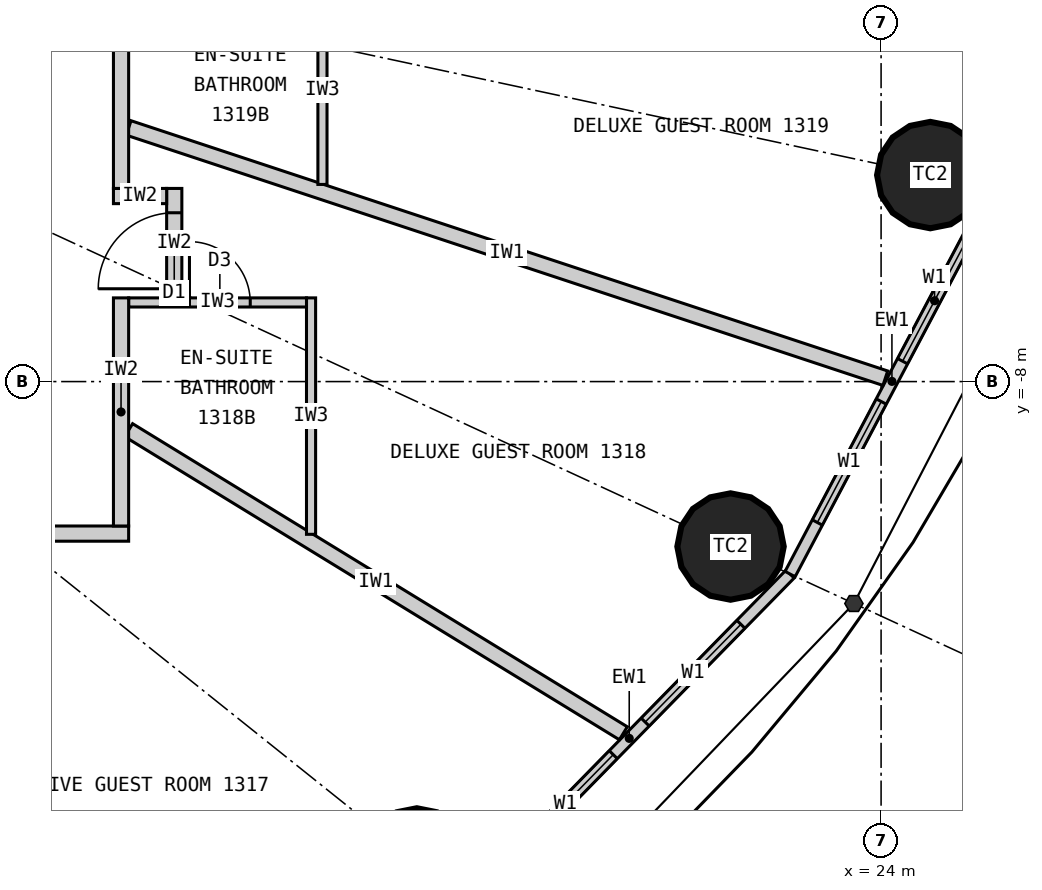
"""IFC4 building model, lengths in metres.
Left out: names, types, materials, properties, quantities, classifications, styles, units other than length and angle.
Written with IfcOpenShell. Run it as: python <this file> out.ifc"""

import sys

from ifc_helpers import new_model, si_unit, direction, frame, frame_2d, origin, origin_2d, place, context, subcontext, project, spatial, rectangle, circle, extrude, element, fill, save


model = new_model("IFC4")
c1 = context("Model", 3, precision=1e-05, world=origin(), true_north=direction((0.0, 1.0)))
c2 = subcontext(c1, "Body", "Model", "MODEL_VIEW")
j1 = project(units=[si_unit("LENGTHUNIT", "METRE"), si_unit("PLANEANGLEUNIT", "RADIAN")], contexts=[c1])
p1 = place(None, origin())
s1 = spatial("IfcSite", under=j1, at=p1, CompositionType="ELEMENT")
p2 = place(p1, origin())
s2 = spatial("IfcBuilding", under=s1, at=p2, CompositionType="ELEMENT")
p3 = place(p2, frame((0.0, 0.0, 57.3)))
s3 = spatial("IfcBuildingStorey", under=s2, at=p3, CompositionType="ELEMENT", Elevation=57.3)
for number, where, z_axis, x_axis in (
    (1, (17.892, -14.313, 0.0), (0.0, 0.0, 1.0), (1.0, 0.0, 0.0)),
    (2, (22.019, -10.17, 0.0), (0.0, 0.0, 1.0), (1.0, 0.0, 0.0)),
    (3, (24.647, -5.283, 0.0), (0.0, 0.0, 1.0), (1.0, 0.0, 0.0)),
):
    element("IfcColumn", number, at=place(p3, frame(where, z_axis=z_axis, x_axis=x_axis)), inside=s3, PredefinedType="COLUMN", context=c2, shape_type="SweptSolid", body=[
        extrude(circle(Radius=0.7, at=origin_2d()), origin(), (0.0, 0.0, 1.0), 3.3),
    ])
p4 = place(p3, frame((18.57, -14.856, 0.0), z_axis=(0.0, 0.0, 1.0), x_axis=(0.699602905915, 0.714531856557, 0.0)))
e4 = element("IfcWall", 4, at=p4, inside=s3, PredefinedType="ELEMENTEDWALL", context=c2, shape_type="SweptSolid", body=[
    extrude(rectangle(XDim=6.051, YDim=0.15, at=frame_2d((3.025, 0.0))), origin(), (0.0, 0.0, 1.0), 3.12),
])
p5 = place(p4, frame((0.926, 0.0, 0.9)))
e5 = element("IfcOpeningElement", 5, at=p5, cuts=e4, PredefinedType="OPENING", context=c2, shape_type="SweptSolid", body=[
    extrude(rectangle(XDim=1.8, YDim=1.9, at=frame_2d((0.9, 0.95))), frame((0.0, 0.085, 0.0), z_axis=(0.0, -1.0, 0.0), x_axis=(1.0, 0.0, 0.0)), (0.0, 0.0, 1.0), 0.17),
])
p6 = place(p4, frame((3.325, 0.0, 0.9)))
e6 = element("IfcOpeningElement", 6, at=p6, cuts=e4, PredefinedType="OPENING", context=c2, shape_type="SweptSolid", body=[
    extrude(rectangle(XDim=1.8, YDim=1.9, at=frame_2d((0.9, 0.95))), frame((0.0, 0.085, 0.0), z_axis=(0.0, -1.0, 0.0), x_axis=(1.0, 0.0, 0.0)), (0.0, 0.0, 1.0), 0.17),
])
p7 = place(p3, frame((22.803, -10.532, 0.0), z_axis=(0.0, 0.0, 1.0), x_axis=(0.467296867008, 0.884100468321, 0.0)))
e7 = element("IfcWall", 7, at=p7, inside=s3, PredefinedType="ELEMENTEDWALL", context=c2, shape_type="SweptSolid", body=[
    extrude(rectangle(XDim=5.734, YDim=0.15, at=frame_2d((2.867, 0.0))), origin(), (0.0, 0.0, 1.0), 3.12),
])
p8 = place(p7, frame((0.767, 0.0, 0.9)))
e8 = element("IfcOpeningElement", 8, at=p8, cuts=e7, PredefinedType="OPENING", context=c2, shape_type="SweptSolid", body=[
    extrude(rectangle(XDim=1.8, YDim=1.9, at=frame_2d((0.9, 0.95))), frame((0.0, 0.085, 0.0), z_axis=(0.0, -1.0, 0.0), x_axis=(1.0, 0.0, 0.0)), (0.0, 0.0, 1.0), 0.17),
])
p9 = place(p7, frame((3.167, 0.0, 0.9)))
e9 = element("IfcOpeningElement", 9, at=p9, cuts=e7, PredefinedType="OPENING", context=c2, shape_type="SweptSolid", body=[
    extrude(rectangle(XDim=1.8, YDim=1.9, at=frame_2d((0.9, 0.95))), frame((0.0, 0.085, 0.0), z_axis=(0.0, -1.0, 0.0), x_axis=(1.0, 0.0, 0.0)), (0.0, 0.0, 1.0), 0.17),
])
p10 = place(p3, frame((14.1, -8.639, 0.0), z_axis=(0.0, 0.0, 1.0), x_axis=(0.852672493023, -0.522445805459, 0.0)))
e10 = element("IfcWall", 10, at=p10, inside=s3, PredefinedType="PARTITIONING", context=c2, shape_type="SweptSolid", body=[
    extrude(rectangle(XDim=7.633, YDim=0.2, at=frame_2d((3.817, 0.0))), origin(), (0.0, 0.0, 1.0), 3.12),
])
p11 = place(p3, frame((14.1, -4.663, 0.0), z_axis=(0.0, 0.0, 1.0), x_axis=(0.949432655039, -0.31397075269, 0.0)))
e11 = element("IfcWall", 11, at=p11, inside=s3, PredefinedType="PARTITIONING", context=c2, shape_type="SweptSolid", body=[
    extrude(rectangle(XDim=10.486, YDim=0.2, at=frame_2d((5.243, 0.0))), origin(), (0.0, 0.0, 1.0), 3.12),
])
p12 = place(p3, frame((16.5, -10.01, 0.0), z_axis=(0.0, 0.0, 1.0), x_axis=(0.0, 1.0, 0.0)))
e12 = element("IfcWall", 12, at=p12, inside=s3, PredefinedType="PARTITIONING", context=c2, shape_type="SweptSolid", body=[
    extrude(rectangle(XDim=3.111, YDim=0.12, at=frame_2d((1.555, 0.0))), origin(), (0.0, 0.0, 1.0), 3.12),
])
p13 = place(p3, frame((14.1, -6.959, 0.0), z_axis=(0.0, 0.0, 1.0), x_axis=(1.0, 0.0, 0.0)))
e13 = element("IfcWall", 13, at=p13, inside=s3, PredefinedType="PARTITIONING", context=c2, shape_type="SweptSolid", body=[
    extrude(rectangle(XDim=2.34, YDim=0.12, at=frame_2d((1.17, 0.0))), origin(), (0.0, 0.0, 1.0), 3.12),
])
p14 = place(p13, frame((0.8, 0.0, 0.0)))
e14 = element("IfcOpeningElement", 14, at=p14, cuts=e13, PredefinedType="OPENING", context=c2, shape_type="SweptSolid", body=[
    extrude(rectangle(XDim=0.8, YDim=2.1, at=frame_2d((0.4, 1.05))), frame((0.0, 0.07, 0.0), z_axis=(0.0, -1.0, 0.0), x_axis=(1.0, 0.0, 0.0)), (0.0, 0.0, 1.0), 0.14),
])
p15 = place(p3, frame((16.65, -5.406, 0.0), z_axis=(0.0, 0.0, 1.0), x_axis=(0.0, 1.0, 0.0)))
e15 = element("IfcWall", 15, at=p15, inside=s3, PredefinedType="PARTITIONING", context=c2, shape_type="SweptSolid", body=[
    extrude(rectangle(XDim=2.483, YDim=0.12, at=frame_2d((1.242, 0.0))), origin(), (0.0, 0.0, 1.0), 3.12),
])
p16 = place(p3, frame((14.7, -6.899, 0.0), z_axis=(0.0, 0.0, 1.0), x_axis=(0.0, 1.0, 0.0)))
e16 = element("IfcWall", 16, at=p16, inside=s3, PredefinedType="PARTITIONING", context=c2, shape_type="SweptSolid", body=[
    extrude(rectangle(XDim=1.44, YDim=0.2, at=frame_2d((0.72, 0.0))), origin(), (0.0, 0.0, 1.0), 3.12),
])
p17 = place(p16, frame((0.12, 0.0, 0.0)))
e17 = element("IfcOpeningElement", 17, at=p17, cuts=e16, PredefinedType="OPENING", context=c2, shape_type="SweptSolid", body=[
    extrude(rectangle(XDim=1.0, YDim=2.2, at=frame_2d((0.5, 1.1))), frame((0.0, 0.11, 0.0), z_axis=(0.0, -1.0, 0.0), x_axis=(1.0, 0.0, 0.0)), (0.0, 0.0, 1.0), 0.22),
])
p18 = place(p3, frame((13.9, -5.559, 0.0), z_axis=(0.0, 0.0, 1.0), x_axis=(1.0, 0.0, 0.0)))
e18 = element("IfcWall", 18, at=p18, inside=s3, PredefinedType="PARTITIONING", context=c2, shape_type="SweptSolid", body=[
    extrude(rectangle(XDim=0.7, YDim=0.2, at=frame_2d((0.35, 0.0))), origin(), (0.0, 0.0, 1.0), 3.12),
])
p19 = place(p3, frame((14.1, -10.0, 0.0), z_axis=(0.0, 0.0, 1.0), x_axis=(-1.0, 0.0, 0.0)))
e19 = element("IfcWall", 19, at=p19, inside=s3, PredefinedType="PARTITIONING", context=c2, shape_type="SweptSolid", body=[
    extrude(rectangle(XDim=2.481, YDim=0.2, at=frame_2d((1.24, 0.0))), origin(), (0.0, 0.0, 1.0), 3.12),
])
p20 = place(p3, frame((14.0, -9.9, 0.0), z_axis=(0.0, 0.0, 1.0), x_axis=(0.0, 1.0, 0.0)))
e20 = element("IfcWall", 20, at=p20, inside=s3, PredefinedType="PARTITIONING", context=c2, shape_type="SweptSolid", body=[
    extrude(rectangle(XDim=3.001, YDim=0.2, at=frame_2d((1.5, 0.0))), origin(), (0.0, 0.0, 1.0), 3.12),
])
p21 = place(p3, frame((14.0, -5.459, 0.0), z_axis=(0.0, 0.0, 1.0), x_axis=(0.0, 1.0, 0.0)))
e21 = element("IfcWall", 21, at=p21, inside=s3, PredefinedType="PARTITIONING", context=c2, shape_type="SweptSolid", body=[
    extrude(rectangle(XDim=15.359, YDim=0.2, at=frame_2d((7.679, 0.0))), origin(), (0.0, 0.0, 1.0), 3.12),
])
p22 = place(p21, frame((2.656, 0.0, 0.0)))
e22 = element("IfcOpeningElement", 22, at=p22, cuts=e21, PredefinedType="OPENING", context=c2, shape_type="SweptSolid", body=[
    extrude(rectangle(XDim=1.0, YDim=2.2, at=frame_2d((0.5, 1.1))), frame((0.0, 0.11, 0.0), z_axis=(0.0, -1.0, 0.0), x_axis=(1.0, 0.0, 0.0)), (0.0, 0.0, 1.0), 0.22),
])
p23 = place(p21, frame((6.537, 0.0, 0.0)))
e23 = element("IfcOpeningElement", 23, at=p23, cuts=e21, PredefinedType="OPENING", context=c2, shape_type="SweptSolid", body=[
    extrude(rectangle(XDim=1.0, YDim=2.2, at=frame_2d((0.5, 1.1))), frame((0.0, 0.11, 0.0), z_axis=(0.0, -1.0, 0.0), x_axis=(1.0, 0.0, 0.0)), (0.0, 0.0, 1.0), 0.22),
])
p24 = place(p21, frame((12.682, 0.0, 0.0)))
e24 = element("IfcOpeningElement", 24, at=p24, cuts=e21, PredefinedType="OPENING", context=c2, shape_type="SweptSolid", body=[
    extrude(rectangle(XDim=1.0, YDim=2.2, at=frame_2d((0.5, 1.1))), frame((0.0, 0.11, 0.0), z_axis=(0.0, -1.0, 0.0), x_axis=(1.0, 0.0, 0.0)), (0.0, 0.0, 1.0), 0.22),
])
p25 = place(p5, origin())
e25 = element("IfcWindow", 25, at=p25, inside=s3, PartitioningType="SINGLE_PANEL", PredefinedType="WINDOW", context=c2, shape_type="SweptSolid", body=[
    extrude(rectangle(XDim=1.8, YDim=1.9, at=frame_2d((0.9, 0.95))), frame((0.0, 0.03, 0.0), z_axis=(0.0, -1.0, 0.0), x_axis=(1.0, 0.0, 0.0)), (0.0, 0.0, 1.0), 0.06),
])
fill(e5, e25)
p26 = place(p6, origin())
e26 = element("IfcWindow", 26, at=p26, inside=s3, PartitioningType="SINGLE_PANEL", PredefinedType="WINDOW", context=c2, shape_type="SweptSolid", body=[
    extrude(rectangle(XDim=1.8, YDim=1.9, at=frame_2d((0.9, 0.95))), frame((0.0, 0.03, 0.0), z_axis=(0.0, -1.0, 0.0), x_axis=(1.0, 0.0, 0.0)), (0.0, 0.0, 1.0), 0.06),
])
fill(e6, e26)
p27 = place(p8, origin())
e27 = element("IfcWindow", 27, at=p27, inside=s3, PartitioningType="SINGLE_PANEL", PredefinedType="WINDOW", context=c2, shape_type="SweptSolid", body=[
    extrude(rectangle(XDim=1.8, YDim=1.9, at=frame_2d((0.9, 0.95))), frame((0.0, 0.03, 0.0), z_axis=(0.0, -1.0, 0.0), x_axis=(1.0, 0.0, 0.0)), (0.0, 0.0, 1.0), 0.06),
])
fill(e8, e27)
p28 = place(p9, origin())
e28 = element("IfcWindow", 28, at=p28, inside=s3, PartitioningType="SINGLE_PANEL", PredefinedType="WINDOW", context=c2, shape_type="SweptSolid", body=[
    extrude(rectangle(XDim=1.8, YDim=1.9, at=frame_2d((0.9, 0.95))), frame((0.0, 0.03, 0.0), z_axis=(0.0, -1.0, 0.0), x_axis=(1.0, 0.0, 0.0)), (0.0, 0.0, 1.0), 0.06),
])
fill(e9, e28)
p29 = place(p14, origin())
e29 = element("IfcDoor", 29, at=p29, inside=s3, OperationType="SINGLE_SWING_LEFT", PredefinedType="DOOR", context=c2, shape_type="SweptSolid", body=[
    extrude(rectangle(XDim=0.8, YDim=2.1, at=frame_2d((0.4, 1.05))), frame((0.0, 0.025, 0.0), z_axis=(0.0, -1.0, 0.0), x_axis=(1.0, 0.0, 0.0)), (0.0, 0.0, 1.0), 0.05),
])
fill(e14, e29)
p30 = place(p17, origin())
e30 = element("IfcDoor", 30, at=p30, inside=s3, OperationType="SINGLE_SWING_LEFT", PredefinedType="DOOR", context=c2, shape_type="SweptSolid", body=[
    extrude(rectangle(XDim=1.0, YDim=2.2, at=frame_2d((0.5, 1.1))), frame((0.0, 0.025, 0.0), z_axis=(0.0, -1.0, 0.0), x_axis=(1.0, 0.0, 0.0)), (0.0, 0.0, 1.0), 0.05),
])
fill(e17, e30)
save(model, sys.argv[1])
